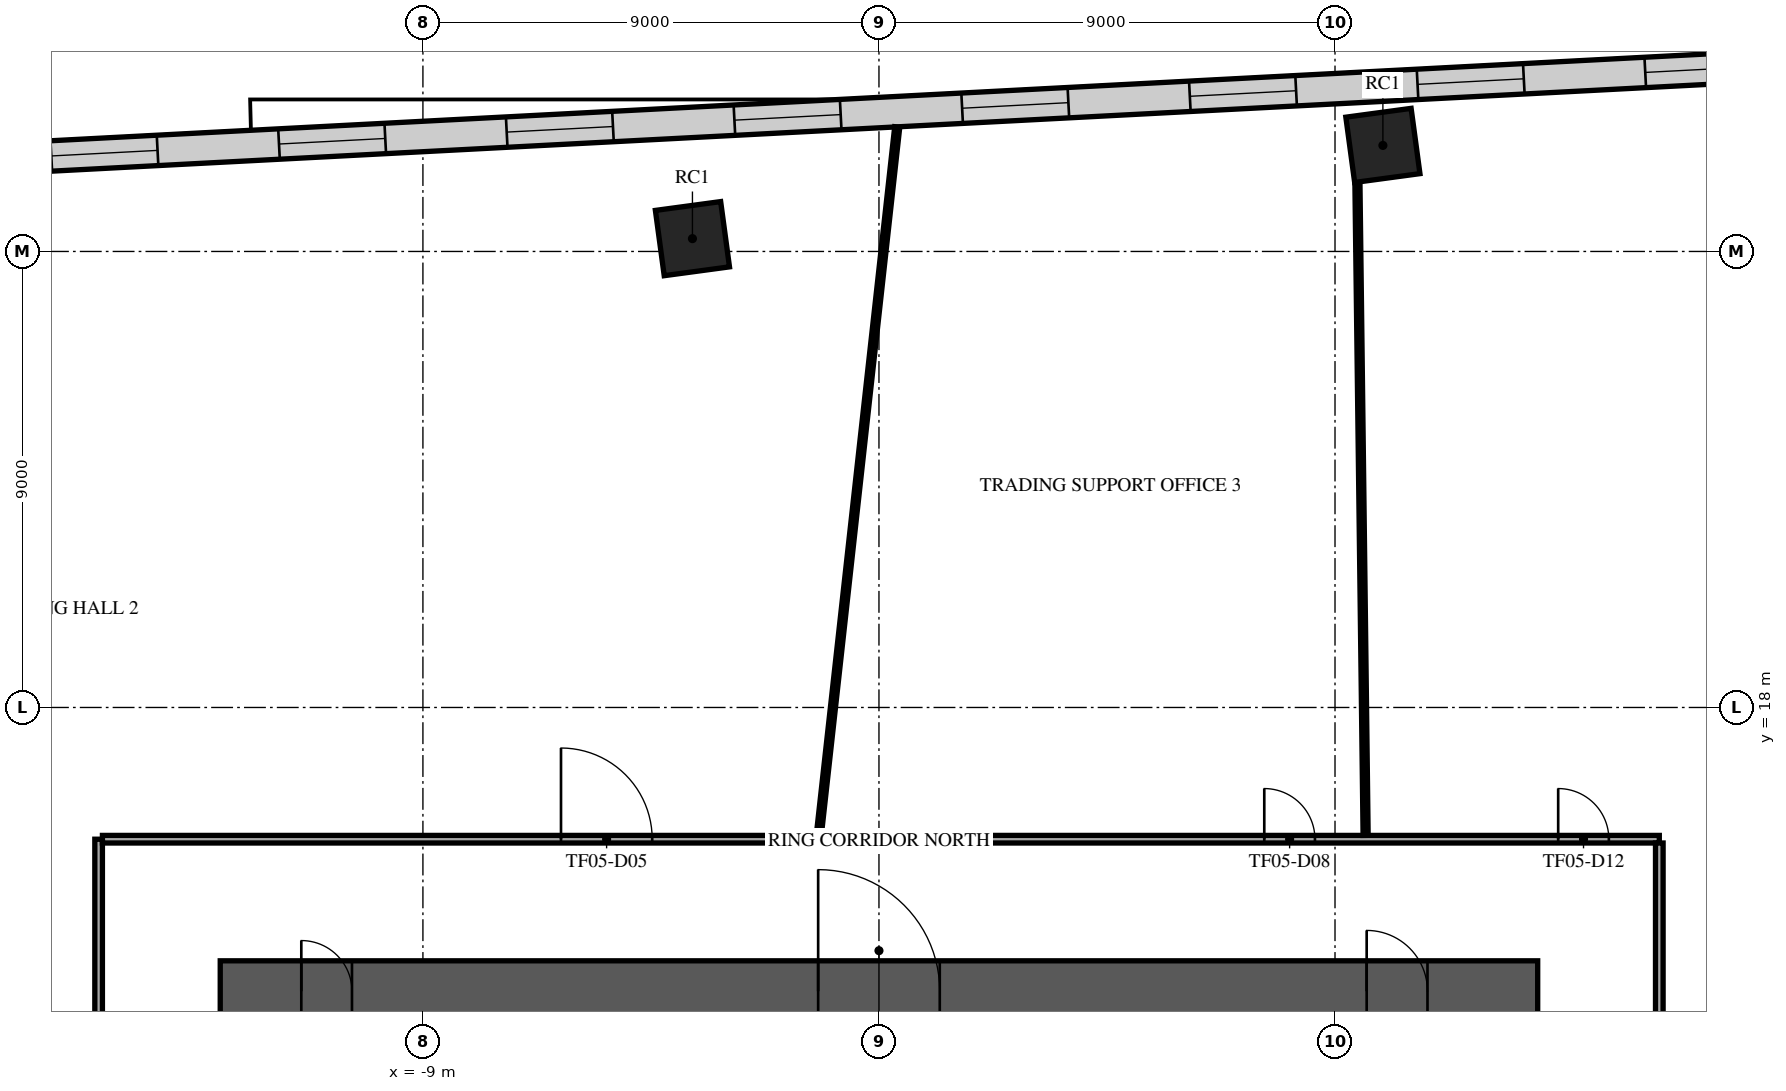
"""IFC4 building model, lengths in metres.
Left out: names, types, materials, properties, quantities, classifications, styles, units other than length and angle.
Written with IfcOpenShell. Run it as: python <this file> out.ifc"""

import sys

from ifc_helpers import new_model, si_unit, direction, frame, frame_2d, origin, origin_2d, place, context, subcontext, project, spatial, rectangle, extrude, element, fill, save


model = new_model("IFC4")
c1 = context("Model", 3, precision=1e-05, world=origin(), true_north=direction((0.0, 1.0)))
c2 = subcontext(c1, "Body", "Model", "MODEL_VIEW")
j1 = project(units=[si_unit("LENGTHUNIT", "METRE"), si_unit("PLANEANGLEUNIT", "RADIAN")], contexts=[c1])
p1 = place(None, origin())
s1 = spatial("IfcSite", under=j1, at=p1, CompositionType="ELEMENT")
p2 = place(p1, origin())
s2 = spatial("IfcBuilding", under=s1, at=p2, CompositionType="ELEMENT")
p3 = place(p2, frame((0.0, 0.0, 22.5)))
s3 = spatial("IfcBuildingStorey", under=s2, at=p3, CompositionType="ELEMENT", Elevation=22.5)
for number, where, z_axis, x_axis in (
    (1, (9.945, 29.093, 0.0), (0.0, 0.0, 1.0), (0.991, 0.134, 0.0)),
    (2, (-3.681, 27.253, 0.0), (0.0, 0.0, 1.0), (0.991, 0.134, 0.0)),
):
    element("IfcColumn", number, at=place(p3, frame(where, z_axis=z_axis, x_axis=x_axis)), inside=s3, PredefinedType="COLUMN", context=c2, shape_type="SweptSolid", body=[
        extrude(rectangle(XDim=1.3, YDim=1.3, at=origin_2d()), origin(), (0.0, 0.0, 1.0), 4.8),
    ])
p4 = place(p3, frame((-13.0, 12.4, 0.0), z_axis=(0.0, 0.0, 1.0), x_axis=(1.0, 0.0, 0.0)))
e3 = element("IfcWall", 3, at=p4, inside=s3, PredefinedType="SHEAR", context=c2, shape_type="SweptSolid", body=[
    extrude(rectangle(XDim=26.0, YDim=1.2, at=frame_2d((13.0, 0.0))), origin(), (0.0, 0.0, 1.0), 4.35),
])
p5 = place(p4, frame((11.8, 0.0, 0.0)))
e4 = element("IfcOpeningElement", 4, at=p5, cuts=e3, PredefinedType="OPENING", context=c2, shape_type="SweptSolid", body=[
    extrude(rectangle(XDim=2.4, YDim=2.4, at=frame_2d((1.2, 1.2))), frame((0.0, 0.61, 0.0), z_axis=(0.0, -1.0, 0.0), x_axis=(1.0, 0.0, 0.0)), (0.0, 0.0, 1.0), 1.22),
])
p6 = place(p4, frame((22.625, 0.0, 0.0)))
e5 = element("IfcOpeningElement", 5, at=p6, cuts=e3, PredefinedType="OPENING", context=c2, shape_type="SweptSolid", body=[
    extrude(rectangle(XDim=1.2, YDim=2.1, at=frame_2d((0.6, 1.05))), frame((0.0, 0.61, 0.0), z_axis=(0.0, -1.0, 0.0), x_axis=(1.0, 0.0, 0.0)), (0.0, 0.0, 1.0), 1.22),
])
p7 = place(p4, frame((1.6, 0.0, 0.0)))
e6 = element("IfcOpeningElement", 6, at=p7, cuts=e3, PredefinedType="OPENING", context=c2, shape_type="SweptSolid", body=[
    extrude(rectangle(XDim=1.0, YDim=2.1, at=frame_2d((0.5, 1.05))), frame((0.0, 0.61, 0.0), z_axis=(0.0, -1.0, 0.0), x_axis=(1.0, 0.0, 0.0)), (0.0, 0.0, 1.0), 1.22),
])
p8 = place(p3, frame((22.912, 30.941, 0.0), z_axis=(0.0, 0.0, 1.0), x_axis=(-0.998629687104, -0.052333049168, 0.0)))
e7 = element("IfcWall", 7, at=p8, inside=s3, PredefinedType="STANDARD", context=c2, shape_type="SweptSolid", body=[
    extrude(rectangle(XDim=49.376, YDim=0.6, at=frame_2d((24.688, 0.0))), origin(), (0.0, 0.0, 1.0), 4.35),
])
p9 = place(p8, frame((1.2, 0.0, 0.9)))
e8 = element("IfcOpeningElement", 8, at=p9, cuts=e7, PredefinedType="OPENING", context=c2, shape_type="SweptSolid", body=[
    extrude(rectangle(XDim=2.1, YDim=2.7, at=frame_2d((1.05, 1.35))), frame((0.0, 0.31, 0.0), z_axis=(0.0, -1.0, 0.0), x_axis=(1.0, 0.0, 0.0)), (0.0, 0.0, 1.0), 0.62),
])
p10 = place(p8, frame((5.7, 0.0, 0.9)))
e9 = element("IfcOpeningElement", 9, at=p10, cuts=e7, PredefinedType="OPENING", context=c2, shape_type="SweptSolid", body=[
    extrude(rectangle(XDim=2.1, YDim=2.7, at=frame_2d((1.05, 1.35))), frame((0.0, 0.31, 0.0), z_axis=(0.0, -1.0, 0.0), x_axis=(1.0, 0.0, 0.0)), (0.0, 0.0, 1.0), 0.62),
])
p11 = place(p8, frame((10.2, 0.0, 0.9)))
e10 = element("IfcOpeningElement", 10, at=p11, cuts=e7, PredefinedType="OPENING", context=c2, shape_type="SweptSolid", body=[
    extrude(rectangle(XDim=2.1, YDim=2.7, at=frame_2d((1.05, 1.35))), frame((0.0, 0.31, 0.0), z_axis=(0.0, -1.0, 0.0), x_axis=(1.0, 0.0, 0.0)), (0.0, 0.0, 1.0), 0.62),
])
p12 = place(p8, frame((14.7, 0.0, 0.9)))
e11 = element("IfcOpeningElement", 11, at=p12, cuts=e7, PredefinedType="OPENING", context=c2, shape_type="SweptSolid", body=[
    extrude(rectangle(XDim=2.1, YDim=2.7, at=frame_2d((1.05, 1.35))), frame((0.0, 0.31, 0.0), z_axis=(0.0, -1.0, 0.0), x_axis=(1.0, 0.0, 0.0)), (0.0, 0.0, 1.0), 0.62),
])
p13 = place(p8, frame((19.2, 0.0, 0.9)))
e12 = element("IfcOpeningElement", 12, at=p13, cuts=e7, PredefinedType="OPENING", context=c2, shape_type="SweptSolid", body=[
    extrude(rectangle(XDim=2.1, YDim=2.7, at=frame_2d((1.05, 1.35))), frame((0.0, 0.31, 0.0), z_axis=(0.0, -1.0, 0.0), x_axis=(1.0, 0.0, 0.0)), (0.0, 0.0, 1.0), 0.62),
])
p14 = place(p8, frame((23.7, 0.0, 0.9)))
e13 = element("IfcOpeningElement", 13, at=p14, cuts=e7, PredefinedType="OPENING", context=c2, shape_type="SweptSolid", body=[
    extrude(rectangle(XDim=2.1, YDim=2.7, at=frame_2d((1.05, 1.35))), frame((0.0, 0.31, 0.0), z_axis=(0.0, -1.0, 0.0), x_axis=(1.0, 0.0, 0.0)), (0.0, 0.0, 1.0), 0.62),
])
p15 = place(p8, frame((28.2, 0.0, 0.9)))
e14 = element("IfcOpeningElement", 14, at=p15, cuts=e7, PredefinedType="OPENING", context=c2, shape_type="SweptSolid", body=[
    extrude(rectangle(XDim=2.1, YDim=2.7, at=frame_2d((1.05, 1.35))), frame((0.0, 0.31, 0.0), z_axis=(0.0, -1.0, 0.0), x_axis=(1.0, 0.0, 0.0)), (0.0, 0.0, 1.0), 0.62),
])
p16 = place(p8, frame((32.7, 0.0, 0.9)))
e15 = element("IfcOpeningElement", 15, at=p16, cuts=e7, PredefinedType="OPENING", context=c2, shape_type="SweptSolid", body=[
    extrude(rectangle(XDim=2.1, YDim=2.7, at=frame_2d((1.05, 1.35))), frame((0.0, 0.31, 0.0), z_axis=(0.0, -1.0, 0.0), x_axis=(1.0, 0.0, 0.0)), (0.0, 0.0, 1.0), 0.62),
])
p17 = place(p8, frame((37.2, 0.0, 0.9)))
e16 = element("IfcOpeningElement", 16, at=p17, cuts=e7, PredefinedType="OPENING", context=c2, shape_type="SweptSolid", body=[
    extrude(rectangle(XDim=2.1, YDim=2.7, at=frame_2d((1.05, 1.35))), frame((0.0, 0.31, 0.0), z_axis=(0.0, -1.0, 0.0), x_axis=(1.0, 0.0, 0.0)), (0.0, 0.0, 1.0), 0.62),
])
p18 = place(p8, frame((41.7, 0.0, 0.9)))
e17 = element("IfcOpeningElement", 17, at=p18, cuts=e7, PredefinedType="OPENING", context=c2, shape_type="SweptSolid", body=[
    extrude(rectangle(XDim=2.1, YDim=2.7, at=frame_2d((1.05, 1.35))), frame((0.0, 0.31, 0.0), z_axis=(0.0, -1.0, 0.0), x_axis=(1.0, 0.0, 0.0)), (0.0, 0.0, 1.0), 0.62),
])
p19 = place(p8, frame((46.138, 0.0, 0.9)))
e18 = element("IfcOpeningElement", 18, at=p19, cuts=e7, PredefinedType="OPENING", context=c2, shape_type="SweptSolid", body=[
    extrude(rectangle(XDim=2.1, YDim=2.7, at=frame_2d((1.05, 1.35))), frame((0.0, 0.31, 0.0), z_axis=(0.0, -1.0, 0.0), x_axis=(1.0, 0.0, 0.0)), (0.0, 0.0, 1.0), 0.62),
])
p20 = place(p3, frame((-15.4, -15.4, 0.0), z_axis=(0.0, 0.0, 1.0), x_axis=(0.0, 1.0, 0.0)))
e19 = element("IfcWall", 19, at=p20, inside=s3, PredefinedType="PARTITIONING", context=c2, shape_type="SweptSolid", body=[
    extrude(rectangle(XDim=30.8, YDim=0.15, at=frame_2d((15.4, 0.0))), origin(), (0.0, 0.0, 1.0), 3.85),
])
p21 = place(p20, frame((17.342, 0.0, 0.0)))
e20 = element("IfcOpeningElement", 20, at=p21, cuts=e19, PredefinedType="OPENING", context=c2, shape_type="SweptSolid", body=[
    extrude(rectangle(XDim=1.8, YDim=2.1, at=frame_2d((0.9, 1.05))), frame((0.0, 0.085, 0.0), z_axis=(0.0, -1.0, 0.0), x_axis=(1.0, 0.0, 0.0)), (0.0, 0.0, 1.0), 0.17),
])
p22 = place(p20, frame((21.842, 0.0, 0.0)))
e21 = element("IfcOpeningElement", 21, at=p22, cuts=e19, PredefinedType="OPENING", context=c2, shape_type="SweptSolid", body=[
    extrude(rectangle(XDim=1.0, YDim=2.1, at=frame_2d((0.5, 1.05))), frame((0.0, 0.085, 0.0), z_axis=(0.0, -1.0, 0.0), x_axis=(1.0, 0.0, 0.0)), (0.0, 0.0, 1.0), 0.17),
])
p23 = place(p20, frame((4.05, 0.0, 0.0)))
e22 = element("IfcOpeningElement", 22, at=p23, cuts=e19, PredefinedType="OPENING", context=c2, shape_type="SweptSolid", body=[
    extrude(rectangle(XDim=1.8, YDim=2.1, at=frame_2d((0.9, 1.05))), frame((0.0, 0.085, 0.0), z_axis=(0.0, -1.0, 0.0), x_axis=(1.0, 0.0, 0.0)), (0.0, 0.0, 1.0), 0.17),
])
p24 = place(p20, frame((10.05, 0.0, 0.0)))
e23 = element("IfcOpeningElement", 23, at=p24, cuts=e19, PredefinedType="OPENING", context=c2, shape_type="SweptSolid", body=[
    extrude(rectangle(XDim=1.0, YDim=2.1, at=frame_2d((0.5, 1.05))), frame((0.0, 0.085, 0.0), z_axis=(0.0, -1.0, 0.0), x_axis=(1.0, 0.0, 0.0)), (0.0, 0.0, 1.0), 0.17),
])
p25 = place(p20, frame((24.266, 0.0, 0.0)))
e24 = element("IfcOpeningElement", 24, at=p25, cuts=e19, PredefinedType="OPENING", context=c2, shape_type="SweptSolid", body=[
    extrude(rectangle(XDim=1.0, YDim=2.1, at=frame_2d((0.5, 1.05))), frame((0.0, 0.085, 0.0), z_axis=(0.0, -1.0, 0.0), x_axis=(1.0, 0.0, 0.0)), (0.0, 0.0, 1.0), 0.17),
])
p26 = place(p3, frame((-15.325, 15.4, 0.0), z_axis=(0.0, 0.0, 1.0), x_axis=(1.0, 0.0, 0.0)))
e25 = element("IfcWall", 25, at=p26, inside=s3, PredefinedType="PARTITIONING", context=c2, shape_type="SweptSolid", body=[
    extrude(rectangle(XDim=30.725, YDim=0.15, at=frame_2d((15.362, 0.0))), origin(), (0.0, 0.0, 1.0), 3.85),
])
p27 = place(p26, frame((9.05, 0.0, 0.0)))
e26 = element("IfcOpeningElement", 26, at=p27, cuts=e25, PredefinedType="OPENING", context=c2, shape_type="SweptSolid", body=[
    extrude(rectangle(XDim=1.8, YDim=2.1, at=frame_2d((0.9, 1.05))), frame((0.0, 0.085, 0.0), z_axis=(0.0, -1.0, 0.0), x_axis=(1.0, 0.0, 0.0)), (0.0, 0.0, 1.0), 0.17),
])
p28 = place(p26, frame((22.929, 0.0, 0.0)))
e27 = element("IfcOpeningElement", 27, at=p28, cuts=e25, PredefinedType="OPENING", context=c2, shape_type="SweptSolid", body=[
    extrude(rectangle(XDim=1.0, YDim=2.1, at=frame_2d((0.5, 1.05))), frame((0.0, 0.085, 0.0), z_axis=(0.0, -1.0, 0.0), x_axis=(1.0, 0.0, 0.0)), (0.0, 0.0, 1.0), 0.17),
])
p29 = place(p26, frame((28.729, 0.0, 0.0)))
e28 = element("IfcOpeningElement", 28, at=p29, cuts=e25, PredefinedType="OPENING", context=c2, shape_type="SweptSolid", body=[
    extrude(rectangle(XDim=1.0, YDim=2.1, at=frame_2d((0.5, 1.05))), frame((0.0, 0.085, 0.0), z_axis=(0.0, -1.0, 0.0), x_axis=(1.0, 0.0, 0.0)), (0.0, 0.0, 1.0), 0.17),
])
p30 = place(p3, frame((15.4, -15.325, 0.0), z_axis=(0.0, 0.0, 1.0), x_axis=(0.0, 1.0, 0.0)))
e29 = element("IfcWall", 29, at=p30, inside=s3, PredefinedType="PARTITIONING", context=c2, shape_type="SweptSolid", body=[
    extrude(rectangle(XDim=30.65, YDim=0.15, at=frame_2d((15.325, 0.0))), origin(), (0.0, 0.0, 1.0), 3.85),
])
p31 = place(p30, frame((25.068, 0.0, 0.0)))
e30 = element("IfcOpeningElement", 30, at=p31, cuts=e29, PredefinedType="OPENING", context=c2, shape_type="SweptSolid", body=[
    extrude(rectangle(XDim=1.8, YDim=2.1, at=frame_2d((0.9, 1.05))), frame((0.0, 0.085, 0.0), z_axis=(0.0, -1.0, 0.0), x_axis=(1.0, 0.0, 0.0)), (0.0, 0.0, 1.0), 0.17),
])
p32 = place(p30, frame((10.927, 0.0, 0.0)))
e31 = element("IfcOpeningElement", 31, at=p32, cuts=e29, PredefinedType="OPENING", context=c2, shape_type="SweptSolid", body=[
    extrude(rectangle(XDim=1.0, YDim=2.1, at=frame_2d((0.5, 1.05))), frame((0.0, 0.085, 0.0), z_axis=(0.0, -1.0, 0.0), x_axis=(1.0, 0.0, 0.0)), (0.0, 0.0, 1.0), 0.17),
])
p33 = place(p3, frame((-1.187, 15.48, 0.0), z_axis=(0.0, 0.0, 1.0), x_axis=(0.110071375312, 0.993923685369, 0.0)))
e32 = element("IfcWall", 32, at=p33, inside=s3, PredefinedType="PARTITIONING", context=c2, shape_type="SweptSolid", body=[
    extrude(rectangle(XDim=14.062, YDim=0.1, at=frame_2d((7.031, 0.0))), origin(), (0.0, 0.0, 1.0), 3.55),
])
p34 = place(p3, frame((9.442, 28.369, 0.0), z_axis=(0.0, 0.0, 1.0), x_axis=(0.01255297586, -0.999921208294, 0.0)))
e33 = element("IfcWall", 33, at=p34, inside=s3, PredefinedType="PARTITIONING", context=c2, shape_type="SweptSolid", body=[
    extrude(rectangle(XDim=12.895, YDim=0.1, at=frame_2d((6.447, 0.0))), origin(), (0.0, 0.0, 1.0), 3.85),
])
p35 = place(p5, origin())
e34 = element("IfcDoor", 34, at=p35, inside=s3, OperationType="SINGLE_SWING_LEFT", PredefinedType="DOOR", context=c2, shape_type="SweptSolid", body=[
    extrude(rectangle(XDim=2.4, YDim=2.4, at=frame_2d((1.2, 1.2))), frame((0.0, 0.025, 0.0), z_axis=(0.0, -1.0, 0.0), x_axis=(1.0, 0.0, 0.0)), (0.0, 0.0, 1.0), 0.05),
])
fill(e4, e34)
p36 = place(p6, origin())
e35 = element("IfcDoor", 35, at=p36, inside=s3, OperationType="SINGLE_SWING_LEFT", PredefinedType="DOOR", context=c2, shape_type="SweptSolid", body=[
    extrude(rectangle(XDim=1.2, YDim=2.1, at=frame_2d((0.6, 1.05))), frame((0.0, 0.025, 0.0), z_axis=(0.0, -1.0, 0.0), x_axis=(1.0, 0.0, 0.0)), (0.0, 0.0, 1.0), 0.05),
])
fill(e5, e35)
p37 = place(p7, origin())
e36 = element("IfcDoor", 36, at=p37, inside=s3, OperationType="SINGLE_SWING_LEFT", PredefinedType="DOOR", context=c2, shape_type="SweptSolid", body=[
    extrude(rectangle(XDim=1.0, YDim=2.1, at=frame_2d((0.5, 1.05))), frame((0.0, 0.025, 0.0), z_axis=(0.0, -1.0, 0.0), x_axis=(1.0, 0.0, 0.0)), (0.0, 0.0, 1.0), 0.05),
])
fill(e6, e36)
p38 = place(p10, origin())
e37 = element("IfcWindow", 37, at=p38, inside=s3, PartitioningType="SINGLE_PANEL", PredefinedType="WINDOW", context=c2, shape_type="SweptSolid", body=[
    extrude(rectangle(XDim=2.1, YDim=2.7, at=frame_2d((1.05, 1.35))), frame((0.0, 0.03, 0.0), z_axis=(0.0, -1.0, 0.0), x_axis=(1.0, 0.0, 0.0)), (0.0, 0.0, 1.0), 0.06),
])
fill(e9, e37)
p39 = place(p11, origin())
e38 = element("IfcWindow", 38, at=p39, inside=s3, PartitioningType="SINGLE_PANEL", PredefinedType="WINDOW", context=c2, shape_type="SweptSolid", body=[
    extrude(rectangle(XDim=2.1, YDim=2.7, at=frame_2d((1.05, 1.35))), frame((0.0, 0.03, 0.0), z_axis=(0.0, -1.0, 0.0), x_axis=(1.0, 0.0, 0.0)), (0.0, 0.0, 1.0), 0.06),
])
fill(e10, e38)
p40 = place(p12, origin())
e39 = element("IfcWindow", 39, at=p40, inside=s3, PartitioningType="SINGLE_PANEL", PredefinedType="WINDOW", context=c2, shape_type="SweptSolid", body=[
    extrude(rectangle(XDim=2.1, YDim=2.7, at=frame_2d((1.05, 1.35))), frame((0.0, 0.03, 0.0), z_axis=(0.0, -1.0, 0.0), x_axis=(1.0, 0.0, 0.0)), (0.0, 0.0, 1.0), 0.06),
])
fill(e11, e39)
p41 = place(p13, origin())
e40 = element("IfcWindow", 40, at=p41, inside=s3, PartitioningType="SINGLE_PANEL", PredefinedType="WINDOW", context=c2, shape_type="SweptSolid", body=[
    extrude(rectangle(XDim=2.1, YDim=2.7, at=frame_2d((1.05, 1.35))), frame((0.0, 0.03, 0.0), z_axis=(0.0, -1.0, 0.0), x_axis=(1.0, 0.0, 0.0)), (0.0, 0.0, 1.0), 0.06),
])
fill(e12, e40)
p42 = place(p14, origin())
e41 = element("IfcWindow", 41, at=p42, inside=s3, PartitioningType="SINGLE_PANEL", PredefinedType="WINDOW", context=c2, shape_type="SweptSolid", body=[
    extrude(rectangle(XDim=2.1, YDim=2.7, at=frame_2d((1.05, 1.35))), frame((0.0, 0.03, 0.0), z_axis=(0.0, -1.0, 0.0), x_axis=(1.0, 0.0, 0.0)), (0.0, 0.0, 1.0), 0.06),
])
fill(e13, e41)
p43 = place(p15, origin())
e42 = element("IfcWindow", 42, at=p43, inside=s3, PartitioningType="SINGLE_PANEL", PredefinedType="WINDOW", context=c2, shape_type="SweptSolid", body=[
    extrude(rectangle(XDim=2.1, YDim=2.7, at=frame_2d((1.05, 1.35))), frame((0.0, 0.03, 0.0), z_axis=(0.0, -1.0, 0.0), x_axis=(1.0, 0.0, 0.0)), (0.0, 0.0, 1.0), 0.06),
])
fill(e14, e42)
p44 = place(p16, origin())
e43 = element("IfcWindow", 43, at=p44, inside=s3, PartitioningType="SINGLE_PANEL", PredefinedType="WINDOW", context=c2, shape_type="SweptSolid", body=[
    extrude(rectangle(XDim=2.1, YDim=2.7, at=frame_2d((1.05, 1.35))), frame((0.0, 0.03, 0.0), z_axis=(0.0, -1.0, 0.0), x_axis=(1.0, 0.0, 0.0)), (0.0, 0.0, 1.0), 0.06),
])
fill(e15, e43)
p45 = place(p17, origin())
e44 = element("IfcWindow", 44, at=p45, inside=s3, PartitioningType="SINGLE_PANEL", PredefinedType="WINDOW", context=c2, shape_type="SweptSolid", body=[
    extrude(rectangle(XDim=2.1, YDim=2.7, at=frame_2d((1.05, 1.35))), frame((0.0, 0.03, 0.0), z_axis=(0.0, -1.0, 0.0), x_axis=(1.0, 0.0, 0.0)), (0.0, 0.0, 1.0), 0.06),
])
fill(e16, e44)
p46 = place(p27, origin())
e45 = element("IfcDoor", 45, at=p46, inside=s3, OperationType="DOUBLE_DOOR_SINGLE_SWING", PredefinedType="DOOR", context=c2, shape_type="SweptSolid", body=[
    extrude(rectangle(XDim=1.8, YDim=2.1, at=frame_2d((0.9, 1.05))), frame((0.0, 0.025, 0.0), z_axis=(0.0, -1.0, 0.0), x_axis=(1.0, 0.0, 0.0)), (0.0, 0.0, 1.0), 0.05),
])
fill(e26, e45)
p47 = place(p28, origin())
e46 = element("IfcDoor", 46, at=p47, inside=s3, OperationType="SINGLE_SWING_RIGHT", PredefinedType="DOOR", context=c2, shape_type="SweptSolid", body=[
    extrude(rectangle(XDim=1.0, YDim=2.1, at=frame_2d((0.5, 1.05))), frame((0.0, 0.025, 0.0), z_axis=(0.0, -1.0, 0.0), x_axis=(1.0, 0.0, 0.0)), (0.0, 0.0, 1.0), 0.05),
])
fill(e27, e46)
p48 = place(p29, origin())
e47 = element("IfcDoor", 47, at=p48, inside=s3, OperationType="SINGLE_SWING_RIGHT", PredefinedType="DOOR", context=c2, shape_type="SweptSolid", body=[
    extrude(rectangle(XDim=1.0, YDim=2.1, at=frame_2d((0.5, 1.05))), frame((0.0, 0.025, 0.0), z_axis=(0.0, -1.0, 0.0), x_axis=(1.0, 0.0, 0.0)), (0.0, 0.0, 1.0), 0.05),
])
fill(e28, e47)
save(model, sys.argv[1])
